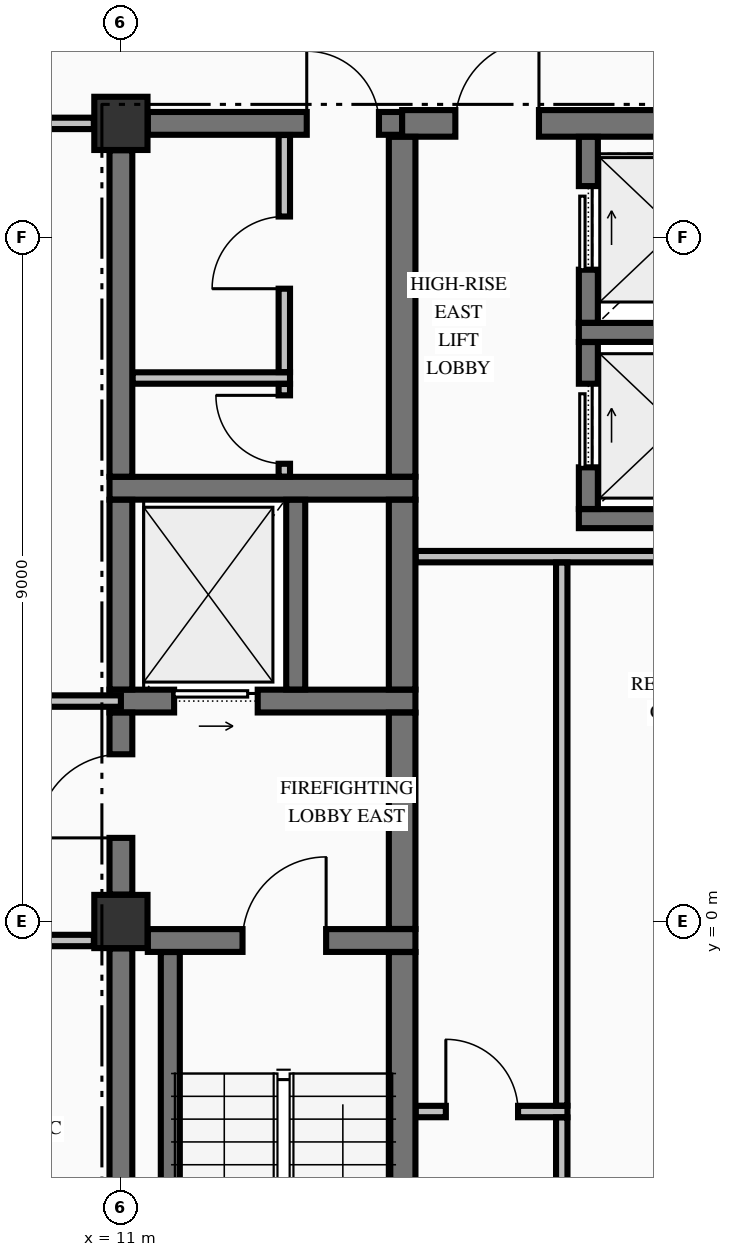
"""IFC4 building model, lengths in metres.
Left out: names, types, materials, properties, quantities, classifications, styles, units other than length and angle.
Written with IfcOpenShell. Run it as: python <this file> out.ifc"""

import sys

from ifc_helpers import new_model, si_unit, direction, frame, frame_2d, origin, origin_2d, place, context, subcontext, project, spatial, rectangle, extrude, element, fill, save


model = new_model("IFC4")
c1 = context("Model", 3, precision=1e-05, world=origin(), true_north=direction((0.0, 1.0)))
c2 = subcontext(c1, "Body", "Model", "MODEL_VIEW")
j1 = project(units=[si_unit("LENGTHUNIT", "METRE"), si_unit("PLANEANGLEUNIT", "RADIAN")], contexts=[c1])
p1 = place(None, origin())
s1 = spatial("IfcSite", under=j1, at=p1, CompositionType="ELEMENT")
p2 = place(p1, origin())
s2 = spatial("IfcBuilding", under=s1, at=p2, CompositionType="ELEMENT")
p3 = place(p2, frame((0.0, 0.0, 246.2)))
s3 = spatial("IfcBuildingStorey", under=s2, at=p3, CompositionType="ELEMENT", Elevation=246.2)
for number, where, z_axis, x_axis in (
    (1, (11.0, 0.0, -0.25), (0.0, 0.0, 1.0), (1.0, 0.0, 0.0)),
    (2, (11.0, 10.5, -0.25), (0.0, 0.0, 1.0), (1.0, 0.0, 0.0)),
):
    element("IfcColumn", number, at=place(p3, frame(where, z_axis=z_axis, x_axis=x_axis)), inside=s3, PredefinedType="COLUMN", context=c2, shape_type="SweptSolid", body=[
        extrude(rectangle(XDim=0.7, YDim=0.7, at=origin_2d()), origin(), (0.0, 0.0, 1.0), 3.055),
    ])
p4 = place(p3, frame((11.354, -0.25, 0.0), z_axis=(0.0, 0.0, 1.0), x_axis=(1.0, 0.0, 0.0)))
e3 = element("IfcWall", 3, at=p4, inside=s3, PredefinedType="SHEAR", context=c2, shape_type="SweptSolid", body=[
    extrude(rectangle(XDim=3.521, YDim=0.3, at=frame_2d((1.76, 0.0))), origin(), (0.0, 0.0, 1.0), 2.805),
])
p5 = place(p4, frame((1.246, 0.0, 0.0)))
e4 = element("IfcOpeningElement", 4, at=p5, cuts=e3, PredefinedType="OPENING", context=c2, shape_type="SweptSolid", body=[
    extrude(rectangle(XDim=1.1, YDim=2.15, at=frame_2d((0.55, 1.075))), frame((0.0, 0.16, 0.0), z_axis=(0.0, -1.0, 0.0), x_axis=(1.0, 0.0, 0.0)), (0.0, 0.0, 1.0), 0.32),
])
p6 = place(p3, frame((10.85, 2.9, 0.0), z_axis=(0.0, 0.0, 1.0), x_axis=(1.0, 0.0, 0.0)))
e5 = element("IfcWall", 5, at=p6, inside=s3, PredefinedType="SHEAR", context=c2, shape_type="SweptSolid", body=[
    extrude(rectangle(XDim=4.025, YDim=0.3, at=frame_2d((2.012, 0.0))), origin(), (0.0, 0.0, 1.0), 2.805),
])
p7 = place(p6, frame((0.85, 0.0, 0.0)))
e6 = element("IfcOpeningElement", 6, at=p7, cuts=e5, PredefinedType="OPENING", context=c2, shape_type="SweptSolid", body=[
    extrude(rectangle(XDim=1.1, YDim=2.2, at=frame_2d((0.55, 1.1))), frame((0.0, 0.16, 0.0), z_axis=(0.0, -1.0, 0.0), x_axis=(1.0, 0.0, 0.0)), (0.0, 0.0, 1.0), 0.32),
])
p8 = place(p3, frame((17.025, 5.3, 0.0), z_axis=(0.0, 0.0, 1.0), x_axis=(1.0, 0.0, 0.0)))
e7 = element("IfcWall", 7, at=p8, inside=s3, PredefinedType="SOLIDWALL", context=c2, shape_type="SweptSolid", body=[
    extrude(rectangle(XDim=3.15, YDim=0.25, at=frame_2d((1.575, 0.0))), origin(), (0.0, 0.0, 1.0), 2.805),
])
p9 = place(p3, frame((10.85, 5.7, 0.0), z_axis=(0.0, 0.0, 1.0), x_axis=(1.0, 0.0, 0.0)))
e8 = element("IfcWall", 8, at=p9, inside=s3, PredefinedType="SHEAR", context=c2, shape_type="SweptSolid", body=[
    extrude(rectangle(XDim=4.025, YDim=0.3, at=frame_2d((2.012, 0.0))), origin(), (0.0, 0.0, 1.0), 2.805),
])
p10 = place(p3, frame((17.025, 7.75, 0.0), z_axis=(0.0, 0.0, 1.0), x_axis=(1.0, 0.0, 0.0)))
e9 = element("IfcWall", 9, at=p10, inside=s3, PredefinedType="SOLIDWALL", context=c2, shape_type="SweptSolid", body=[
    extrude(rectangle(XDim=3.15, YDim=0.25, at=frame_2d((1.575, 0.0))), origin(), (0.0, 0.0, 1.0), 2.805),
])
p11 = place(p3, frame((11.354, 10.5, 0.0), z_axis=(0.0, 0.0, 1.0), x_axis=(1.0, 0.0, 0.0)))
e10 = element("IfcWall", 10, at=p11, inside=s3, PredefinedType="SHEAR", context=c2, shape_type="SweptSolid", body=[
    extrude(rectangle(XDim=3.346, YDim=0.3, at=frame_2d((1.673, 0.0))), origin(), (0.0, 0.0, 1.0), 2.805),
])
p12 = place(p11, frame((2.091, 0.0, 0.0)))
e11 = element("IfcOpeningElement", 11, at=p12, cuts=e10, PredefinedType="OPENING", context=c2, shape_type="SweptSolid", body=[
    extrude(rectangle(XDim=0.95, YDim=2.15, at=frame_2d((0.475, 1.075))), frame((0.0, 0.16, 0.0), z_axis=(0.0, -1.0, 0.0), x_axis=(1.0, 0.0, 0.0)), (0.0, 0.0, 1.0), 0.32),
])
p13 = place(p3, frame((14.7, 10.5, 0.0), z_axis=(0.0, 0.0, 1.0), x_axis=(1.0, 0.0, 0.0)))
e12 = element("IfcWall", 12, at=p13, inside=s3, PredefinedType="SHEAR", context=c2, shape_type="SweptSolid", body=[
    extrude(rectangle(XDim=4.946, YDim=0.35, at=frame_2d((2.473, 0.0))), origin(), (0.0, 0.0, 1.0), 2.805),
])
p14 = place(p13, frame((0.7, 0.0, 0.0)))
e13 = element("IfcOpeningElement", 13, at=p14, cuts=e12, PredefinedType="OPENING", context=c2, shape_type="SweptSolid", body=[
    extrude(rectangle(XDim=1.1, YDim=2.15, at=frame_2d((0.55, 1.075))), frame((0.0, 0.185, 0.0), z_axis=(0.0, -1.0, 0.0), x_axis=(1.0, 0.0, 0.0)), (0.0, 0.0, 1.0), 0.37),
])
p15 = place(p3, frame((14.878, -2.5, 0.0), z_axis=(0.0, 0.0, 1.0), x_axis=(1.0, 0.0, 0.0)))
e14 = element("IfcWall", 14, at=p15, inside=s3, PredefinedType="PARTITIONING", context=c2, shape_type="SweptSolid", body=[
    extrude(rectangle(XDim=1.997, YDim=0.15, at=frame_2d((0.999, 0.0))), origin(), (0.0, 0.0, 1.0), 2.805),
])
p16 = place(p15, frame((0.397, 0.0, 0.0)))
e15 = element("IfcOpeningElement", 15, at=p16, cuts=e14, PredefinedType="OPENING", context=c2, shape_type="SweptSolid", body=[
    extrude(rectangle(XDim=0.95, YDim=2.15, at=frame_2d((0.475, 1.075))), frame((0.0, 0.085, 0.0), z_axis=(0.0, -1.0, 0.0), x_axis=(1.0, 0.0, 0.0)), (0.0, 0.0, 1.0), 0.17),
])
p17 = place(p3, frame((-10.644, -0.25, 0.0), z_axis=(0.0, 0.0, 1.0), x_axis=(1.0, 0.0, 0.0)))
e16 = element("IfcWall", 16, at=p17, inside=s3, PredefinedType="PARTITIONING", context=c2, shape_type="SweptSolid", body=[
    extrude(rectangle(XDim=21.288, YDim=0.15, at=frame_2d((10.644, 0.0))), origin(), (0.0, 0.0, 1.0), 2.805),
])
p18 = place(p17, frame((7.344, 0.0, 0.0)))
e17 = element("IfcOpeningElement", 17, at=p18, cuts=e16, PredefinedType="OPENING", context=c2, shape_type="SweptSolid", body=[
    extrude(rectangle(XDim=1.1, YDim=2.15, at=frame_2d((0.55, 1.075))), frame((0.0, 0.085, 0.0), z_axis=(0.0, -1.0, 0.0), x_axis=(1.0, 0.0, 0.0)), (0.0, 0.0, 1.0), 0.17),
])
p19 = place(p17, frame((2.699, 0.0, 0.0)))
e18 = element("IfcOpeningElement", 18, at=p19, cuts=e16, PredefinedType="OPENING", context=c2, shape_type="SweptSolid", body=[
    extrude(rectangle(XDim=1.05, YDim=2.15, at=frame_2d((0.525, 1.075))), frame((0.0, 0.085, 0.0), z_axis=(0.0, -1.0, 0.0), x_axis=(1.0, 0.0, 0.0)), (0.0, 0.0, 1.0), 0.17),
])
p20 = place(p17, frame((14.839, 0.0, 0.0)))
e19 = element("IfcOpeningElement", 19, at=p20, cuts=e16, PredefinedType="OPENING", context=c2, shape_type="SweptSolid", body=[
    extrude(rectangle(XDim=0.95, YDim=2.15, at=frame_2d((0.475, 1.075))), frame((0.0, 0.085, 0.0), z_axis=(0.0, -1.0, 0.0), x_axis=(1.0, 0.0, 0.0)), (0.0, 0.0, 1.0), 0.17),
])
p21 = place(p3, frame((-11.0, 2.9, 0.0), z_axis=(0.0, 0.0, 1.0), x_axis=(1.0, 0.0, 0.0)))
e20 = element("IfcWall", 20, at=p21, inside=s3, PredefinedType="PARTITIONING", context=c2, shape_type="SweptSolid", body=[
    extrude(rectangle(XDim=22.0, YDim=0.15, at=frame_2d((11.0, 0.0))), origin(), (0.0, 0.0, 1.0), 2.805),
])
p22 = place(p21, frame((7.7, 0.0, 0.0)))
e21 = element("IfcOpeningElement", 21, at=p22, cuts=e20, PredefinedType="OPENING", context=c2, shape_type="SweptSolid", body=[
    extrude(rectangle(XDim=1.1, YDim=2.15, at=frame_2d((0.55, 1.075))), frame((0.0, 0.085, 0.0), z_axis=(0.0, -1.0, 0.0), x_axis=(1.0, 0.0, 0.0)), (0.0, 0.0, 1.0), 0.17),
])
p23 = place(p21, frame((3.055, 0.0, 0.0)))
e22 = element("IfcOpeningElement", 22, at=p23, cuts=e20, PredefinedType="OPENING", context=c2, shape_type="SweptSolid", body=[
    extrude(rectangle(XDim=1.05, YDim=2.15, at=frame_2d((0.525, 1.075))), frame((0.0, 0.085, 0.0), z_axis=(0.0, -1.0, 0.0), x_axis=(1.0, 0.0, 0.0)), (0.0, 0.0, 1.0), 0.17),
])
p24 = place(p21, frame((11.475, 0.0, 0.0)))
e23 = element("IfcOpeningElement", 23, at=p24, cuts=e20, PredefinedType="OPENING", context=c2, shape_type="SweptSolid", body=[
    extrude(rectangle(XDim=0.95, YDim=2.15, at=frame_2d((0.475, 1.075))), frame((0.0, 0.085, 0.0), z_axis=(0.0, -1.0, 0.0), x_axis=(1.0, 0.0, 0.0)), (0.0, 0.0, 1.0), 0.17),
])
p25 = place(p21, frame((17.795, 0.0, 0.0)))
e24 = element("IfcOpeningElement", 24, at=p25, cuts=e20, PredefinedType="OPENING", context=c2, shape_type="SweptSolid", body=[
    extrude(rectangle(XDim=0.95, YDim=2.15, at=frame_2d((0.475, 1.075))), frame((0.0, 0.085, 0.0), z_axis=(0.0, -1.0, 0.0), x_axis=(1.0, 0.0, 0.0)), (0.0, 0.0, 1.0), 0.17),
])
p26 = place(p3, frame((14.878, 4.8, 0.0), z_axis=(0.0, 0.0, 1.0), x_axis=(1.0, 0.0, 0.0)))
e25 = element("IfcWall", 25, at=p26, inside=s3, PredefinedType="PARTITIONING", context=c2, shape_type="SweptSolid", body=[
    extrude(rectangle(XDim=4.944, YDim=0.15, at=frame_2d((2.472, 0.0))), origin(), (0.0, 0.0, 1.0), 2.805),
])
p27 = place(p3, frame((11.153, 7.15, 0.0), z_axis=(0.0, 0.0, 1.0), x_axis=(1.0, 0.0, 0.0)))
e26 = element("IfcWall", 26, at=p27, inside=s3, PredefinedType="PARTITIONING", context=c2, shape_type="SweptSolid", body=[
    extrude(rectangle(XDim=2.072, YDim=0.15, at=frame_2d((1.036, 0.0))), origin(), (0.0, 0.0, 1.0), 2.805),
])
p28 = place(p3, frame((-10.644, 10.5, 0.0), z_axis=(0.0, 0.0, 1.0), x_axis=(1.0, 0.0, 0.0)))
e27 = element("IfcWall", 27, at=p28, inside=s3, PredefinedType="PARTITIONING", context=c2, shape_type="SweptSolid", body=[
    extrude(rectangle(XDim=21.288, YDim=0.15, at=frame_2d((10.644, 0.0))), origin(), (0.0, 0.0, 1.0), 2.805),
])
p29 = place(p28, frame((7.344, 0.0, 0.0)))
e28 = element("IfcOpeningElement", 28, at=p29, cuts=e27, PredefinedType="OPENING", context=c2, shape_type="SweptSolid", body=[
    extrude(rectangle(XDim=1.1, YDim=2.15, at=frame_2d((0.55, 1.075))), frame((0.0, 0.085, 0.0), z_axis=(0.0, -1.0, 0.0), x_axis=(1.0, 0.0, 0.0)), (0.0, 0.0, 1.0), 0.17),
])
p30 = place(p3, frame((11.0, -9.596, 0.0), z_axis=(0.0, 0.0, 1.0), x_axis=(0.0, 1.0, 0.0)))
e29 = element("IfcWall", 29, at=p30, inside=s3, PredefinedType="SHEAR", context=c2, shape_type="SweptSolid", body=[
    extrude(rectangle(XDim=9.242, YDim=0.3, at=frame_2d((4.621, 0.0))), origin(), (0.0, 0.0, 1.0), 2.805),
])
p31 = place(p3, frame((11.0, 0.354, 0.0), z_axis=(0.0, 0.0, 1.0), x_axis=(0.0, 1.0, 0.0)))
e30 = element("IfcWall", 30, at=p31, inside=s3, PredefinedType="SHEAR", context=c2, shape_type="SweptSolid", body=[
    extrude(rectangle(XDim=2.394, YDim=0.3, at=frame_2d((1.197, 0.0))), origin(), (0.0, 0.0, 1.0), 2.805),
])
p32 = place(p31, frame((0.746, 0.0, 0.0)))
e31 = element("IfcOpeningElement", 31, at=p32, cuts=e30, PredefinedType="OPENING", context=c2, shape_type="SweptSolid", body=[
    extrude(rectangle(XDim=1.1, YDim=2.15, at=frame_2d((0.55, 1.075))), frame((0.0, 0.16, 0.0), z_axis=(0.0, -1.0, 0.0), x_axis=(1.0, 0.0, 0.0)), (0.0, 0.0, 1.0), 0.32),
])
p33 = place(p3, frame((11.0, 3.052, 0.0), z_axis=(0.0, 0.0, 1.0), x_axis=(0.0, 1.0, 0.0)))
e32 = element("IfcWall", 32, at=p33, inside=s3, PredefinedType="SHEAR", context=c2, shape_type="SweptSolid", body=[
    extrude(rectangle(XDim=2.496, YDim=0.3, at=frame_2d((1.248, 0.0))), origin(), (0.0, 0.0, 1.0), 2.805),
])
p34 = place(p3, frame((11.0, 5.852, 0.0), z_axis=(0.0, 0.0, 1.0), x_axis=(0.0, 1.0, 0.0)))
e33 = element("IfcWall", 33, at=p34, inside=s3, PredefinedType="SHEAR", context=c2, shape_type="SweptSolid", body=[
    extrude(rectangle(XDim=4.294, YDim=0.3, at=frame_2d((2.147, 0.0))), origin(), (0.0, 0.0, 1.0), 2.805),
])
p35 = place(p3, frame((11.65, -9.798, 0.0), z_axis=(0.0, 0.0, 1.0), x_axis=(0.0, 1.0, 0.0)))
e34 = element("IfcWall", 34, at=p35, inside=s3, PredefinedType="SOLIDWALL", context=c2, shape_type="SweptSolid", body=[
    extrude(rectangle(XDim=9.396, YDim=0.25, at=frame_2d((4.698, 0.0))), origin(), (0.0, 0.0, 1.0), 2.805),
])
p36 = place(p3, frame((13.3, 3.052, 0.0), z_axis=(0.0, 0.0, 1.0), x_axis=(0.0, 1.0, 0.0)))
e35 = element("IfcWall", 35, at=p36, inside=s3, PredefinedType="SOLIDWALL", context=c2, shape_type="SweptSolid", body=[
    extrude(rectangle(XDim=2.496, YDim=0.25, at=frame_2d((1.248, 0.0))), origin(), (0.0, 0.0, 1.0), 2.805),
])
p37 = place(p3, frame((14.7, -9.773, 0.0), z_axis=(0.0, 0.0, 1.0), x_axis=(0.0, 1.0, 0.0)))
e36 = element("IfcWall", 36, at=p37, inside=s3, PredefinedType="SHEAR", context=c2, shape_type="SweptSolid", body=[
    extrude(rectangle(XDim=9.371, YDim=0.35, at=frame_2d((4.686, 0.0))), origin(), (0.0, 0.0, 1.0), 2.805),
])
p38 = place(p3, frame((14.7, -0.098, 0.0), z_axis=(0.0, 0.0, 1.0), x_axis=(0.0, 1.0, 0.0)))
e37 = element("IfcWall", 37, at=p38, inside=s3, PredefinedType="SHEAR", context=c2, shape_type="SweptSolid", body=[
    extrude(rectangle(XDim=2.846, YDim=0.35, at=frame_2d((1.423, 0.0))), origin(), (0.0, 0.0, 1.0), 2.805),
])
p39 = place(p3, frame((14.7, 3.052, 0.0), z_axis=(0.0, 0.0, 1.0), x_axis=(0.0, 1.0, 0.0)))
e38 = element("IfcWall", 38, at=p39, inside=s3, PredefinedType="SHEAR", context=c2, shape_type="SweptSolid", body=[
    extrude(rectangle(XDim=2.496, YDim=0.35, at=frame_2d((1.248, 0.0))), origin(), (0.0, 0.0, 1.0), 2.805),
])
p40 = place(p3, frame((14.7, 5.852, 0.0), z_axis=(0.0, 0.0, 1.0), x_axis=(0.0, 1.0, 0.0)))
e39 = element("IfcWall", 39, at=p40, inside=s3, PredefinedType="SHEAR", context=c2, shape_type="SweptSolid", body=[
    extrude(rectangle(XDim=4.471, YDim=0.35, at=frame_2d((2.235, 0.0))), origin(), (0.0, 0.0, 1.0), 2.805),
])
p41 = place(p3, frame((17.15, 5.427, 0.0), z_axis=(0.0, 0.0, 1.0), x_axis=(0.0, 1.0, 0.0)))
e40 = element("IfcWall", 40, at=p41, inside=s3, PredefinedType="SOLIDWALL", context=c2, shape_type="SweptSolid", body=[
    extrude(rectangle(XDim=2.196, YDim=0.25, at=frame_2d((1.098, 0.0))), origin(), (0.0, 0.0, 1.0), 2.805),
])
p42 = place(p41, frame((0.548, 0.0, 0.0)))
e41 = element("IfcOpeningElement", 41, at=p42, cuts=e40, PredefinedType="OPENING", context=c2, shape_type="SweptSolid", body=[
    extrude(rectangle(XDim=1.1, YDim=2.2, at=frame_2d((0.55, 1.1))), frame((0.0, 0.135, 0.0), z_axis=(0.0, -1.0, 0.0), x_axis=(1.0, 0.0, 0.0)), (0.0, 0.0, 1.0), 0.27),
])
p43 = place(p3, frame((17.15, 7.877, 0.0), z_axis=(0.0, 0.0, 1.0), x_axis=(0.0, 1.0, 0.0)))
e42 = element("IfcWall", 42, at=p43, inside=s3, PredefinedType="SOLIDWALL", context=c2, shape_type="SweptSolid", body=[
    extrude(rectangle(XDim=2.446, YDim=0.25, at=frame_2d((1.223, 0.0))), origin(), (0.0, 0.0, 1.0), 2.805),
])
p44 = place(p43, frame((0.698, 0.0, 0.0)))
e43 = element("IfcOpeningElement", 43, at=p44, cuts=e42, PredefinedType="OPENING", context=c2, shape_type="SweptSolid", body=[
    extrude(rectangle(XDim=1.1, YDim=2.2, at=frame_2d((0.55, 1.1))), frame((0.0, 0.135, 0.0), z_axis=(0.0, -1.0, 0.0), x_axis=(1.0, 0.0, 0.0)), (0.0, 0.0, 1.0), 0.27),
])
p45 = place(p3, frame((13.15, 5.853, 0.0), z_axis=(0.0, 0.0, 1.0), x_axis=(0.0, 1.0, 0.0)))
e44 = element("IfcWall", 44, at=p45, inside=s3, PredefinedType="PARTITIONING", context=c2, shape_type="SweptSolid", body=[
    extrude(rectangle(XDim=1.219, YDim=0.15, at=frame_2d((0.609, 0.0))), origin(), (0.0, 0.0, 1.0), 2.805),
])
p46 = place(p45, frame((0.169, 0.0, 0.0)))
e45 = element("IfcOpeningElement", 45, at=p46, cuts=e44, PredefinedType="OPENING", context=c2, shape_type="SweptSolid", body=[
    extrude(rectangle(XDim=0.9, YDim=2.15, at=frame_2d((0.45, 1.075))), frame((0.0, 0.085, 0.0), z_axis=(0.0, -1.0, 0.0), x_axis=(1.0, 0.0, 0.0)), (0.0, 0.0, 1.0), 0.17),
])
p47 = place(p3, frame((13.15, 7.228, 0.0), z_axis=(0.0, 0.0, 1.0), x_axis=(0.0, 1.0, 0.0)))
e46 = element("IfcWall", 46, at=p47, inside=s3, PredefinedType="PARTITIONING", context=c2, shape_type="SweptSolid", body=[
    extrude(rectangle(XDim=3.119, YDim=0.15, at=frame_2d((1.56, 0.0))), origin(), (0.0, 0.0, 1.0), 2.805),
])
p48 = place(p47, frame((1.097, 0.0, 0.0)))
e47 = element("IfcOpeningElement", 47, at=p48, cuts=e46, PredefinedType="OPENING", context=c2, shape_type="SweptSolid", body=[
    extrude(rectangle(XDim=0.95, YDim=2.15, at=frame_2d((0.475, 1.075))), frame((0.0, 0.085, 0.0), z_axis=(0.0, -1.0, 0.0), x_axis=(1.0, 0.0, 0.0)), (0.0, 0.0, 1.0), 0.17),
])
p49 = place(p3, frame((16.8, -9.772, 0.0), z_axis=(0.0, 0.0, 1.0), x_axis=(0.0, 1.0, 0.0)))
e48 = element("IfcWall", 48, at=p49, inside=s3, PredefinedType="PARTITIONING", context=c2, shape_type="SweptSolid", body=[
    extrude(rectangle(XDim=7.194, YDim=0.15, at=frame_2d((3.597, 0.0))), origin(), (0.0, 0.0, 1.0), 2.805),
])
p50 = place(p3, frame((16.8, -2.422, 0.0), z_axis=(0.0, 0.0, 1.0), x_axis=(0.0, 1.0, 0.0)))
e49 = element("IfcWall", 49, at=p50, inside=s3, PredefinedType="PARTITIONING", context=c2, shape_type="SweptSolid", body=[
    extrude(rectangle(XDim=7.144, YDim=0.15, at=frame_2d((3.572, 0.0))), origin(), (0.0, 0.0, 1.0), 2.805),
])
p51 = place(p5, origin())
e50 = element("IfcDoor", 50, at=p51, inside=s3, OperationType="SINGLE_SWING_RIGHT", PredefinedType="DOOR", context=c2, shape_type="SweptSolid", body=[
    extrude(rectangle(XDim=1.1, YDim=2.15, at=frame_2d((0.55, 1.075))), frame((0.0, 0.025, 0.0), z_axis=(0.0, -1.0, 0.0), x_axis=(1.0, 0.0, 0.0)), (0.0, 0.0, 1.0), 0.05),
])
fill(e4, e50)
p52 = place(p32, origin())
e51 = element("IfcDoor", 51, at=p52, inside=s3, OperationType="SINGLE_SWING_LEFT", PredefinedType="DOOR", context=c2, shape_type="SweptSolid", body=[
    extrude(rectangle(XDim=1.1, YDim=2.15, at=frame_2d((0.55, 1.075))), frame((0.0, 0.025, 0.0), z_axis=(0.0, -1.0, 0.0), x_axis=(1.0, 0.0, 0.0)), (0.0, 0.0, 1.0), 0.05),
])
fill(e31, e51)
p53 = place(p7, origin())
e52 = element("IfcDoor", 52, at=p53, inside=s3, OperationType="SLIDING_TO_RIGHT", PredefinedType="DOOR", context=c2, shape_type="SweptSolid", body=[
    extrude(rectangle(XDim=1.1, YDim=2.2, at=frame_2d((0.55, 1.1))), frame((0.0, 0.025, 0.0), z_axis=(0.0, -1.0, 0.0), x_axis=(1.0, 0.0, 0.0)), (0.0, 0.0, 1.0), 0.05),
])
fill(e6, e52)
p54 = place(p12, origin())
e53 = element("IfcDoor", 53, at=p54, inside=s3, OperationType="SINGLE_SWING_LEFT", PredefinedType="DOOR", context=c2, shape_type="SweptSolid", body=[
    extrude(rectangle(XDim=0.95, YDim=2.15, at=frame_2d((0.475, 1.075))), frame((0.0, 0.025, 0.0), z_axis=(0.0, -1.0, 0.0), x_axis=(1.0, 0.0, 0.0)), (0.0, 0.0, 1.0), 0.05),
])
fill(e11, e53)
p55 = place(p46, origin())
e54 = element("IfcDoor", 54, at=p55, inside=s3, OperationType="SINGLE_SWING_RIGHT", PredefinedType="DOOR", context=c2, shape_type="SweptSolid", body=[
    extrude(rectangle(XDim=0.9, YDim=2.15, at=frame_2d((0.45, 1.075))), frame((0.0, 0.025, 0.0), z_axis=(0.0, -1.0, 0.0), x_axis=(1.0, 0.0, 0.0)), (0.0, 0.0, 1.0), 0.05),
])
fill(e45, e54)
p56 = place(p48, origin())
e55 = element("IfcDoor", 55, at=p56, inside=s3, OperationType="SINGLE_SWING_LEFT", PredefinedType="DOOR", context=c2, shape_type="SweptSolid", body=[
    extrude(rectangle(XDim=0.95, YDim=2.15, at=frame_2d((0.475, 1.075))), frame((0.0, 0.025, 0.0), z_axis=(0.0, -1.0, 0.0), x_axis=(1.0, 0.0, 0.0)), (0.0, 0.0, 1.0), 0.05),
])
fill(e47, e55)
p57 = place(p42, origin())
e56 = element("IfcDoor", 56, at=p57, inside=s3, OperationType="SLIDING_TO_RIGHT", PredefinedType="DOOR", context=c2, shape_type="SweptSolid", body=[
    extrude(rectangle(XDim=1.1, YDim=2.2, at=frame_2d((0.55, 1.1))), frame((0.0, 0.025, 0.0), z_axis=(0.0, -1.0, 0.0), x_axis=(1.0, 0.0, 0.0)), (0.0, 0.0, 1.0), 0.05),
])
fill(e41, e56)
p58 = place(p44, origin())
e57 = element("IfcDoor", 57, at=p58, inside=s3, OperationType="SLIDING_TO_RIGHT", PredefinedType="DOOR", context=c2, shape_type="SweptSolid", body=[
    extrude(rectangle(XDim=1.1, YDim=2.2, at=frame_2d((0.55, 1.1))), frame((0.0, 0.025, 0.0), z_axis=(0.0, -1.0, 0.0), x_axis=(1.0, 0.0, 0.0)), (0.0, 0.0, 1.0), 0.05),
])
fill(e43, e57)
p59 = place(p14, origin())
e58 = element("IfcDoor", 58, at=p59, inside=s3, OperationType="SINGLE_SWING_RIGHT", PredefinedType="DOOR", context=c2, shape_type="SweptSolid", body=[
    extrude(rectangle(XDim=1.1, YDim=2.15, at=frame_2d((0.55, 1.075))), frame((0.0, 0.025, 0.0), z_axis=(0.0, -1.0, 0.0), x_axis=(1.0, 0.0, 0.0)), (0.0, 0.0, 1.0), 0.05),
])
fill(e13, e58)
p60 = place(p16, origin())
e59 = element("IfcDoor", 59, at=p60, inside=s3, OperationType="SINGLE_SWING_LEFT", PredefinedType="DOOR", context=c2, shape_type="SweptSolid", body=[
    extrude(rectangle(XDim=0.95, YDim=2.15, at=frame_2d((0.475, 1.075))), frame((0.0, 0.025, 0.0), z_axis=(0.0, -1.0, 0.0), x_axis=(1.0, 0.0, 0.0)), (0.0, 0.0, 1.0), 0.05),
])
fill(e15, e59)
save(model, sys.argv[1])
